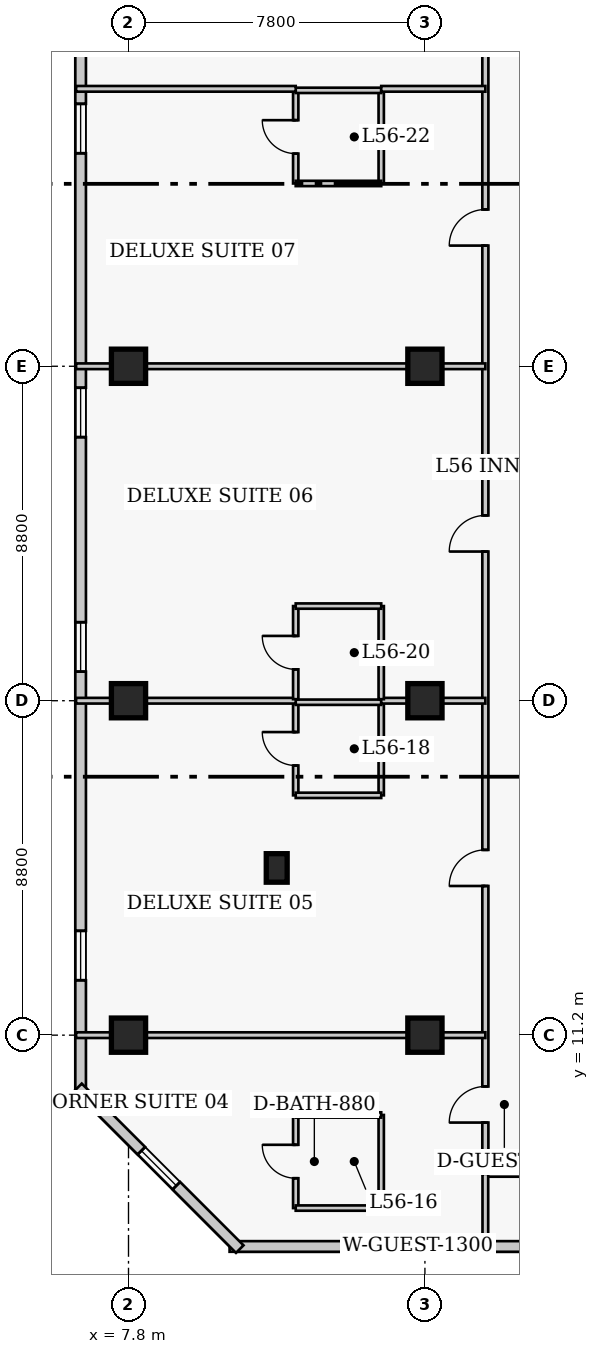
"""IFC4 building model, lengths in metres.
Left out: names, types, materials, properties, quantities, classifications, styles, units other than length and angle.
Written with IfcOpenShell. Run it as: python <this file> out.ifc"""

import sys

from ifc_helpers import new_model, si_unit, direction, frame, frame_2d, origin, origin_2d, place, context, subcontext, project, spatial, rectangle, extrude, element, fill, save


model = new_model("IFC4")
c1 = context("Model", 3, precision=1e-05, world=origin(), true_north=direction((0.0, 1.0)))
c2 = subcontext(c1, "Body", "Model", "MODEL_VIEW")
j1 = project(units=[si_unit("LENGTHUNIT", "METRE"), si_unit("PLANEANGLEUNIT", "RADIAN")], contexts=[c1])
p1 = place(None, origin())
s1 = spatial("IfcSite", under=j1, at=p1, CompositionType="ELEMENT")
p2 = place(p1, origin())
s2 = spatial("IfcBuilding", under=s1, at=p2, CompositionType="ELEMENT")
p3 = place(p2, frame((0.0, 0.0, 224.1)))
s3 = spatial("IfcBuildingStorey", under=s2, at=p3, CompositionType="ELEMENT", Elevation=224.1)
for number, where, z_axis, x_axis in (
    (1, (7.8, 11.2, 0.0), (0.0, 0.0, 1.0), (1.0, 0.0, 0.0)),
    (2, (7.8, 20.0, 0.0), (0.0, 0.0, 1.0), (1.0, 0.0, 0.0)),
    (3, (7.8, 28.8, 0.0), (0.0, 0.0, 1.0), (1.0, 0.0, 0.0)),
    (4, (15.6, 11.2, 0.0), (0.0, 0.0, 1.0), (1.0, 0.0, 0.0)),
    (5, (15.6, 20.0, 0.0), (0.0, 0.0, 1.0), (1.0, 0.0, 0.0)),
    (6, (15.6, 28.8, 0.0), (0.0, 0.0, 1.0), (1.0, 0.0, 0.0)),
):
    element("IfcColumn", number, at=place(p3, frame(where, z_axis=z_axis, x_axis=x_axis)), inside=s3, PredefinedType="COLUMN", context=c2, shape_type="SweptSolid", body=[
        extrude(rectangle(XDim=0.9, YDim=0.9, at=origin_2d()), origin(), (0.0, 0.0, 1.0), 3.9),
    ])
p4 = place(p3, frame((11.7, 15.6, 0.0), z_axis=(0.0, 0.0, 1.0), x_axis=(1.0, 0.0, 0.0)))
e7 = element("IfcColumn", 7, at=p4, inside=s3, PredefinedType="PILASTER", context=c2, shape_type="SweptSolid", body=[
    extrude(rectangle(XDim=0.55, YDim=0.75, at=origin_2d()), origin(), (0.0, 0.0, 1.0), 3.9),
])
p5 = place(p3, frame((10.46, 5.64, 0.0), z_axis=(0.0, 0.0, 1.0), x_axis=(1.0, 0.0, 0.0)))
e8 = element("IfcWall", 8, at=p5, inside=s3, PredefinedType="SOLIDWALL", context=c2, shape_type="SweptSolid", body=[
    extrude(rectangle(XDim=25.83, YDim=0.28, at=frame_2d((12.915, 0.0))), origin(), (0.0, 0.0, 1.0), 3.65),
])
p6 = place(p5, frame((4.305, 0.0, 0.85)))
e9 = element("IfcOpeningElement", 9, at=p6, cuts=e8, PredefinedType="OPENING", context=c2, shape_type="SweptSolid", body=[
    extrude(rectangle(XDim=1.3, YDim=1.7, at=frame_2d((0.65, 0.85))), frame((0.0, 0.15, 0.0), z_axis=(0.0, -1.0, 0.0), x_axis=(1.0, 0.0, 0.0)), (0.0, 0.0, 1.0), 0.3),
])
p7 = place(p5, frame((11.615, 0.0, 0.85)))
e10 = element("IfcOpeningElement", 10, at=p7, cuts=e8, PredefinedType="OPENING", context=c2, shape_type="SweptSolid", body=[
    extrude(rectangle(XDim=1.3, YDim=1.7, at=frame_2d((0.65, 0.85))), frame((0.0, 0.15, 0.0), z_axis=(0.0, -1.0, 0.0), x_axis=(1.0, 0.0, 0.0)), (0.0, 0.0, 1.0), 0.3),
])
p8 = place(p5, frame((20.875, 0.0, 0.85)))
e11 = element("IfcOpeningElement", 11, at=p8, cuts=e8, PredefinedType="OPENING", context=c2, shape_type="SweptSolid", body=[
    extrude(rectangle(XDim=1.3, YDim=1.7, at=frame_2d((0.65, 0.85))), frame((0.0, 0.15, 0.0), z_axis=(0.0, -1.0, 0.0), x_axis=(1.0, 0.0, 0.0)), (0.0, 0.0, 1.0), 0.3),
])
p9 = place(p3, frame((6.54, 39.44, 0.0), z_axis=(0.0, 0.0, 1.0), x_axis=(0.0, -1.0, 0.0)))
e12 = element("IfcWall", 12, at=p9, inside=s3, PredefinedType="SOLIDWALL", context=c2, shape_type="SweptSolid", body=[
    extrude(rectangle(XDim=29.88, YDim=0.28, at=frame_2d((14.94, 0.0))), origin(), (0.0, 0.0, 1.0), 3.65),
])
p10 = place(p9, frame((3.735, 0.0, 0.85)))
e13 = element("IfcOpeningElement", 13, at=p10, cuts=e12, PredefinedType="OPENING", context=c2, shape_type="SweptSolid", body=[
    extrude(rectangle(XDim=1.3, YDim=1.7, at=frame_2d((0.65, 0.85))), frame((0.0, 0.15, 0.0), z_axis=(0.0, -1.0, 0.0), x_axis=(1.0, 0.0, 0.0)), (0.0, 0.0, 1.0), 0.3),
])
p11 = place(p9, frame((11.205, 0.0, 0.85)))
e14 = element("IfcOpeningElement", 14, at=p11, cuts=e12, PredefinedType="OPENING", context=c2, shape_type="SweptSolid", body=[
    extrude(rectangle(XDim=1.3, YDim=1.7, at=frame_2d((0.65, 0.85))), frame((0.0, 0.15, 0.0), z_axis=(0.0, -1.0, 0.0), x_axis=(1.0, 0.0, 0.0)), (0.0, 0.0, 1.0), 0.3),
])
p12 = place(p9, frame((17.375, 0.0, 0.85)))
e15 = element("IfcOpeningElement", 15, at=p12, cuts=e12, PredefinedType="OPENING", context=c2, shape_type="SweptSolid", body=[
    extrude(rectangle(XDim=1.3, YDim=1.7, at=frame_2d((0.65, 0.85))), frame((0.0, 0.15, 0.0), z_axis=(0.0, -1.0, 0.0), x_axis=(1.0, 0.0, 0.0)), (0.0, 0.0, 1.0), 0.3),
])
p13 = place(p9, frame((25.495, 0.0, 0.85)))
e16 = element("IfcOpeningElement", 16, at=p13, cuts=e12, PredefinedType="OPENING", context=c2, shape_type="SweptSolid", body=[
    extrude(rectangle(XDim=1.3, YDim=1.7, at=frame_2d((0.65, 0.85))), frame((0.0, 0.15, 0.0), z_axis=(0.0, -1.0, 0.0), x_axis=(1.0, 0.0, 0.0)), (0.0, 0.0, 1.0), 0.3),
])
p14 = place(p3, frame((6.471, 9.827, 0.0), z_axis=(0.0, 0.0, 1.0), x_axis=(0.707106781187, -0.707106781187, 0.0)))
e17 = element("IfcWall", 17, at=p14, inside=s3, PredefinedType="SOLIDWALL", context=c2, shape_type="SweptSolid", body=[
    extrude(rectangle(XDim=6.02, YDim=0.28, at=frame_2d((3.01, 0.0))), origin(), (0.0, 0.0, 1.0), 3.65),
])
p15 = place(p14, frame((2.36, 0.0, 0.85)))
e18 = element("IfcOpeningElement", 18, at=p15, cuts=e17, PredefinedType="OPENING", context=c2, shape_type="SweptSolid", body=[
    extrude(rectangle(XDim=1.3, YDim=1.7, at=frame_2d((0.65, 0.85))), frame((0.0, 0.15, 0.0), z_axis=(0.0, -1.0, 0.0), x_axis=(1.0, 0.0, 0.0)), (0.0, 0.0, 1.0), 0.3),
])
p16 = place(p3, frame((17.19, 7.55, 0.0), z_axis=(0.0, 0.0, 1.0), x_axis=(0.0, 1.0, 0.0)))
e19 = element("IfcWall", 19, at=p16, inside=s3, PredefinedType="PARTITIONING", context=c2, shape_type="SweptSolid", body=[
    extrude(rectangle(XDim=33.1, YDim=0.16, at=frame_2d((16.55, 0.0))), origin(), (0.0, 0.0, 1.0), 3.65),
])
p17 = place(p16, frame((1.35, 0.0, 0.0)))
e20 = element("IfcOpeningElement", 20, at=p17, cuts=e19, PredefinedType="OPENING", context=c2, shape_type="SweptSolid", body=[
    extrude(rectangle(XDim=0.95, YDim=2.1, at=frame_2d((0.475, 1.05))), frame((0.0, 0.09, 0.0), z_axis=(0.0, -1.0, 0.0), x_axis=(1.0, 0.0, 0.0)), (0.0, 0.0, 1.0), 0.18),
])
p18 = place(p16, frame((7.575, 0.0, 0.0)))
e21 = element("IfcOpeningElement", 21, at=p18, cuts=e19, PredefinedType="OPENING", context=c2, shape_type="SweptSolid", body=[
    extrude(rectangle(XDim=0.95, YDim=2.1, at=frame_2d((0.475, 1.05))), frame((0.0, 0.09, 0.0), z_axis=(0.0, -1.0, 0.0), x_axis=(1.0, 0.0, 0.0)), (0.0, 0.0, 1.0), 0.18),
])
p19 = place(p16, frame((16.375, 0.0, 0.0)))
e22 = element("IfcOpeningElement", 22, at=p19, cuts=e19, PredefinedType="OPENING", context=c2, shape_type="SweptSolid", body=[
    extrude(rectangle(XDim=0.95, YDim=2.1, at=frame_2d((0.475, 1.05))), frame((0.0, 0.09, 0.0), z_axis=(0.0, -1.0, 0.0), x_axis=(1.0, 0.0, 0.0)), (0.0, 0.0, 1.0), 0.18),
])
p20 = place(p16, frame((24.425, 0.0, 0.0)))
e23 = element("IfcOpeningElement", 23, at=p20, cuts=e19, PredefinedType="OPENING", context=c2, shape_type="SweptSolid", body=[
    extrude(rectangle(XDim=0.95, YDim=2.1, at=frame_2d((0.475, 1.05))), frame((0.0, 0.09, 0.0), z_axis=(0.0, -1.0, 0.0), x_axis=(1.0, 0.0, 0.0)), (0.0, 0.0, 1.0), 0.18),
])
p21 = place(p16, frame((31.66, 0.0, 0.0)))
e24 = element("IfcOpeningElement", 24, at=p21, cuts=e19, PredefinedType="OPENING", context=c2, shape_type="SweptSolid", body=[
    extrude(rectangle(XDim=1.0, YDim=2.15, at=frame_2d((0.5, 1.075))), frame((0.0, 0.09, 0.0), z_axis=(0.0, -1.0, 0.0), x_axis=(1.0, 0.0, 0.0)), (0.0, 0.0, 1.0), 0.18),
])
p22 = place(p3, frame((17.19, 7.55, 0.0), z_axis=(0.0, 0.0, 1.0), x_axis=(1.0, 0.0, 0.0)))
e25 = element("IfcWall", 25, at=p22, inside=s3, PredefinedType="PARTITIONING", context=c2, shape_type="SweptSolid", body=[
    extrude(rectangle(XDim=2.22, YDim=0.15, at=frame_2d((1.11, 0.0))), origin(), (0.0, 0.0, 1.0), 3.65),
])
p23 = place(p3, frame((17.19, 5.52, 0.0), z_axis=(0.0, 0.0, 1.0), x_axis=(0.0, 1.0, 0.0)))
e26 = element("IfcWall", 26, at=p23, inside=s3, PredefinedType="PARTITIONING", context=c2, shape_type="SweptSolid", body=[
    extrude(rectangle(XDim=2.03, YDim=0.15, at=frame_2d((1.015, 0.0))), origin(), (0.0, 0.0, 1.0), 3.65),
])
p24 = place(p3, frame((12.2, 6.65, 0.0), z_axis=(0.0, 0.0, 1.0), x_axis=(0.0, 1.0, 0.0)))
e27 = element("IfcWall", 27, at=p24, inside=s3, PredefinedType="PLUMBINGWALL", context=c2, shape_type="SweptSolid", body=[
    extrude(rectangle(XDim=2.45, YDim=0.14, at=frame_2d((1.225, 0.0))), origin(), (0.0, 0.0, 1.0), 3.65),
])
p25 = place(p24, frame((0.785, 0.0, 0.0)))
e28 = element("IfcOpeningElement", 28, at=p25, cuts=e27, PredefinedType="OPENING", context=c2, shape_type="SweptSolid", body=[
    extrude(rectangle(XDim=0.88, YDim=2.05, at=frame_2d((0.44, 1.025))), frame((0.0, 0.08, 0.0), z_axis=(0.0, -1.0, 0.0), x_axis=(1.0, 0.0, 0.0)), (0.0, 0.0, 1.0), 0.16),
])
p26 = place(p3, frame((14.45, 6.65, 0.0), z_axis=(0.0, 0.0, 1.0), x_axis=(0.0, 1.0, 0.0)))
e29 = element("IfcWall", 29, at=p26, inside=s3, PredefinedType="PLUMBINGWALL", context=c2, shape_type="SweptSolid", body=[
    extrude(rectangle(XDim=2.45, YDim=0.14, at=frame_2d((1.225, 0.0))), origin(), (0.0, 0.0, 1.0), 3.65),
])
for number, where, z_axis, x_axis in (
    (30, (12.2, 6.65, 0.0), (0.0, 0.0, 1.0), (1.0, 0.0, 0.0)),
    (31, (12.2, 9.1, 0.0), (0.0, 0.0, 1.0), (1.0, 0.0, 0.0)),
):
    element("IfcWall", number, at=place(p3, frame(where, z_axis=z_axis, x_axis=x_axis)), inside=s3, PredefinedType="PLUMBINGWALL", context=c2, shape_type="SweptSolid", body=[
        extrude(rectangle(XDim=2.25, YDim=0.14, at=frame_2d((1.125, 0.0))), origin(), (0.0, 0.0, 1.0), 3.65),
    ])
p27 = place(p3, frame((6.42, 11.2, 0.0), z_axis=(0.0, 0.0, 1.0), x_axis=(1.0, 0.0, 0.0)))
e32 = element("IfcWall", 32, at=p27, inside=s3, PredefinedType="PARTITIONING", context=c2, shape_type="SweptSolid", body=[
    extrude(rectangle(XDim=10.77, YDim=0.15, at=frame_2d((5.385, 0.0))), origin(), (0.0, 0.0, 1.0), 2.878),
])
p28 = place(p3, frame((12.2, 17.51, 0.0), z_axis=(0.0, 0.0, 1.0), x_axis=(0.0, 1.0, 0.0)))
e33 = element("IfcWall", 33, at=p28, inside=s3, PredefinedType="PLUMBINGWALL", context=c2, shape_type="SweptSolid", body=[
    extrude(rectangle(XDim=2.45, YDim=0.14, at=frame_2d((1.225, 0.0))), origin(), (0.0, 0.0, 1.0), 3.65),
])
p29 = place(p28, frame((0.785, 0.0, 0.0)))
e34 = element("IfcOpeningElement", 34, at=p29, cuts=e33, PredefinedType="OPENING", context=c2, shape_type="SweptSolid", body=[
    extrude(rectangle(XDim=0.88, YDim=2.05, at=frame_2d((0.44, 1.025))), frame((0.0, 0.08, 0.0), z_axis=(0.0, -1.0, 0.0), x_axis=(1.0, 0.0, 0.0)), (0.0, 0.0, 1.0), 0.16),
])
p30 = place(p3, frame((14.45, 17.51, 0.0), z_axis=(0.0, 0.0, 1.0), x_axis=(0.0, 1.0, 0.0)))
e35 = element("IfcWall", 35, at=p30, inside=s3, PredefinedType="PLUMBINGWALL", context=c2, shape_type="SweptSolid", body=[
    extrude(rectangle(XDim=2.45, YDim=0.14, at=frame_2d((1.225, 0.0))), origin(), (0.0, 0.0, 1.0), 3.65),
])
p31 = place(p3, frame((12.2, 17.51, 0.0), z_axis=(0.0, 0.0, 1.0), x_axis=(1.0, 0.0, 0.0)))
e36 = element("IfcWall", 36, at=p31, inside=s3, PredefinedType="PLUMBINGWALL", context=c2, shape_type="SweptSolid", body=[
    extrude(rectangle(XDim=2.25, YDim=0.14, at=frame_2d((1.125, 0.0))), origin(), (0.0, 0.0, 1.0), 3.65),
])
p32 = place(p3, frame((12.2, 19.96, 0.0), z_axis=(0.0, 0.0, 1.0), x_axis=(1.0, 0.0, 0.0)))
e37 = element("IfcWall", 37, at=p32, inside=s3, PredefinedType="PLUMBINGWALL", context=c2, shape_type="SweptSolid", body=[
    extrude(rectangle(XDim=2.25, YDim=0.14, at=frame_2d((1.125, 0.0))), origin(), (0.0, 0.0, 1.0), 3.038),
])
p33 = place(p3, frame((6.42, 20.0, 0.0), z_axis=(0.0, 0.0, 1.0), x_axis=(1.0, 0.0, 0.0)))
e38 = element("IfcWall", 38, at=p33, inside=s3, PredefinedType="PARTITIONING", context=c2, shape_type="SweptSolid", body=[
    extrude(rectangle(XDim=5.78, YDim=0.15, at=frame_2d((2.89, 0.0))), origin(), (0.0, 0.0, 1.0), 2.878),
])
p34 = place(p3, frame((14.45, 20.0, 0.0), z_axis=(0.0, 0.0, 1.0), x_axis=(1.0, 0.0, 0.0)))
e39 = element("IfcWall", 39, at=p34, inside=s3, PredefinedType="PARTITIONING", context=c2, shape_type="SweptSolid", body=[
    extrude(rectangle(XDim=2.74, YDim=0.15, at=frame_2d((1.37, 0.0))), origin(), (0.0, 0.0, 1.0), 2.878),
])
p35 = place(p3, frame((12.2, 20.04, 0.0), z_axis=(0.0, 0.0, 1.0), x_axis=(0.0, 1.0, 0.0)))
e40 = element("IfcWall", 40, at=p35, inside=s3, PredefinedType="PLUMBINGWALL", context=c2, shape_type="SweptSolid", body=[
    extrude(rectangle(XDim=2.45, YDim=0.14, at=frame_2d((1.225, 0.0))), origin(), (0.0, 0.0, 1.0), 3.65),
])
p36 = place(p35, frame((0.785, 0.0, 0.0)))
e41 = element("IfcOpeningElement", 41, at=p36, cuts=e40, PredefinedType="OPENING", context=c2, shape_type="SweptSolid", body=[
    extrude(rectangle(XDim=0.88, YDim=2.05, at=frame_2d((0.44, 1.025))), frame((0.0, 0.08, 0.0), z_axis=(0.0, -1.0, 0.0), x_axis=(1.0, 0.0, 0.0)), (0.0, 0.0, 1.0), 0.16),
])
p37 = place(p3, frame((14.45, 20.04, 0.0), z_axis=(0.0, 0.0, 1.0), x_axis=(0.0, 1.0, 0.0)))
e42 = element("IfcWall", 42, at=p37, inside=s3, PredefinedType="PLUMBINGWALL", context=c2, shape_type="SweptSolid", body=[
    extrude(rectangle(XDim=2.45, YDim=0.14, at=frame_2d((1.225, 0.0))), origin(), (0.0, 0.0, 1.0), 3.65),
])
p38 = place(p3, frame((12.2, 22.49, 0.0), z_axis=(0.0, 0.0, 1.0), x_axis=(1.0, 0.0, 0.0)))
e43 = element("IfcWall", 43, at=p38, inside=s3, PredefinedType="PLUMBINGWALL", context=c2, shape_type="SweptSolid", body=[
    extrude(rectangle(XDim=2.25, YDim=0.14, at=frame_2d((1.125, 0.0))), origin(), (0.0, 0.0, 1.0), 3.65),
])
p39 = place(p3, frame((6.42, 28.8, 0.0), z_axis=(0.0, 0.0, 1.0), x_axis=(1.0, 0.0, 0.0)))
e44 = element("IfcWall", 44, at=p39, inside=s3, PredefinedType="PARTITIONING", context=c2, shape_type="SweptSolid", body=[
    extrude(rectangle(XDim=10.77, YDim=0.15, at=frame_2d((5.385, 0.0))), origin(), (0.0, 0.0, 1.0), 2.878),
])
p40 = place(p3, frame((12.2, 33.61, 0.0), z_axis=(0.0, 0.0, 1.0), x_axis=(0.0, 1.0, 0.0)))
e45 = element("IfcWall", 45, at=p40, inside=s3, PredefinedType="PLUMBINGWALL", context=c2, shape_type="SweptSolid", body=[
    extrude(rectangle(XDim=2.45, YDim=0.14, at=frame_2d((1.225, 0.0))), origin(), (0.0, 0.0, 1.0), 3.65),
])
p41 = place(p40, frame((0.785, 0.0, 0.0)))
e46 = element("IfcOpeningElement", 46, at=p41, cuts=e45, PredefinedType="OPENING", context=c2, shape_type="SweptSolid", body=[
    extrude(rectangle(XDim=0.88, YDim=2.05, at=frame_2d((0.44, 1.025))), frame((0.0, 0.08, 0.0), z_axis=(0.0, -1.0, 0.0), x_axis=(1.0, 0.0, 0.0)), (0.0, 0.0, 1.0), 0.16),
])
p42 = place(p3, frame((14.45, 33.61, 0.0), z_axis=(0.0, 0.0, 1.0), x_axis=(0.0, 1.0, 0.0)))
e47 = element("IfcWall", 47, at=p42, inside=s3, PredefinedType="PLUMBINGWALL", context=c2, shape_type="SweptSolid", body=[
    extrude(rectangle(XDim=2.45, YDim=0.14, at=frame_2d((1.225, 0.0))), origin(), (0.0, 0.0, 1.0), 3.65),
])
for number, where, z_axis, x_axis in (
    (48, (12.2, 33.61, 0.0), (0.0, 0.0, 1.0), (1.0, 0.0, 0.0)),
    (49, (12.2, 36.06, 0.0), (0.0, 0.0, 1.0), (1.0, 0.0, 0.0)),
):
    element("IfcWall", number, at=place(p3, frame(where, z_axis=z_axis, x_axis=x_axis)), inside=s3, PredefinedType="PLUMBINGWALL", context=c2, shape_type="SweptSolid", body=[
        extrude(rectangle(XDim=2.25, YDim=0.14, at=frame_2d((1.125, 0.0))), origin(), (0.0, 0.0, 1.0), 3.65),
    ])
p43 = place(p3, frame((6.42, 36.1, 0.0), z_axis=(0.0, 0.0, 1.0), x_axis=(1.0, 0.0, 0.0)))
e50 = element("IfcWall", 50, at=p43, inside=s3, PredefinedType="PARTITIONING", context=c2, shape_type="SweptSolid", body=[
    extrude(rectangle(XDim=5.78, YDim=0.15, at=frame_2d((2.89, 0.0))), origin(), (0.0, 0.0, 1.0), 3.65),
])
p44 = place(p3, frame((14.45, 36.1, 0.0), z_axis=(0.0, 0.0, 1.0), x_axis=(1.0, 0.0, 0.0)))
e51 = element("IfcWall", 51, at=p44, inside=s3, PredefinedType="PARTITIONING", context=c2, shape_type="SweptSolid", body=[
    extrude(rectangle(XDim=2.74, YDim=0.15, at=frame_2d((1.37, 0.0))), origin(), (0.0, 0.0, 1.0), 3.65),
])
p45 = place(p6, origin())
e52 = element("IfcWindow", 52, at=p45, inside=s3, PartitioningType="SINGLE_PANEL", PredefinedType="WINDOW", context=c2, shape_type="SweptSolid", body=[
    extrude(rectangle(XDim=1.3, YDim=1.7, at=frame_2d((0.65, 0.85))), frame((0.0, 0.03, 0.0), z_axis=(0.0, -1.0, 0.0), x_axis=(1.0, 0.0, 0.0)), (0.0, 0.0, 1.0), 0.06),
])
fill(e9, e52)
p46 = place(p10, origin())
e53 = element("IfcWindow", 53, at=p46, inside=s3, PartitioningType="SINGLE_PANEL", PredefinedType="WINDOW", context=c2, shape_type="SweptSolid", body=[
    extrude(rectangle(XDim=1.3, YDim=1.7, at=frame_2d((0.65, 0.85))), frame((0.0, 0.03, 0.0), z_axis=(0.0, -1.0, 0.0), x_axis=(1.0, 0.0, 0.0)), (0.0, 0.0, 1.0), 0.06),
])
fill(e13, e53)
p47 = place(p11, origin())
e54 = element("IfcWindow", 54, at=p47, inside=s3, PartitioningType="SINGLE_PANEL", PredefinedType="WINDOW", context=c2, shape_type="SweptSolid", body=[
    extrude(rectangle(XDim=1.3, YDim=1.7, at=frame_2d((0.65, 0.85))), frame((0.0, 0.03, 0.0), z_axis=(0.0, -1.0, 0.0), x_axis=(1.0, 0.0, 0.0)), (0.0, 0.0, 1.0), 0.06),
])
fill(e14, e54)
p48 = place(p12, origin())
e55 = element("IfcWindow", 55, at=p48, inside=s3, PartitioningType="SINGLE_PANEL", PredefinedType="WINDOW", context=c2, shape_type="SweptSolid", body=[
    extrude(rectangle(XDim=1.3, YDim=1.7, at=frame_2d((0.65, 0.85))), frame((0.0, 0.03, 0.0), z_axis=(0.0, -1.0, 0.0), x_axis=(1.0, 0.0, 0.0)), (0.0, 0.0, 1.0), 0.06),
])
fill(e15, e55)
p49 = place(p13, origin())
e56 = element("IfcWindow", 56, at=p49, inside=s3, PartitioningType="SINGLE_PANEL", PredefinedType="WINDOW", context=c2, shape_type="SweptSolid", body=[
    extrude(rectangle(XDim=1.3, YDim=1.7, at=frame_2d((0.65, 0.85))), frame((0.0, 0.03, 0.0), z_axis=(0.0, -1.0, 0.0), x_axis=(1.0, 0.0, 0.0)), (0.0, 0.0, 1.0), 0.06),
])
fill(e16, e56)
p50 = place(p15, origin())
e57 = element("IfcWindow", 57, at=p50, inside=s3, PartitioningType="SINGLE_PANEL", PredefinedType="WINDOW", context=c2, shape_type="SweptSolid", body=[
    extrude(rectangle(XDim=1.3, YDim=1.7, at=frame_2d((0.65, 0.85))), frame((0.0, 0.03, 0.0), z_axis=(0.0, -1.0, 0.0), x_axis=(1.0, 0.0, 0.0)), (0.0, 0.0, 1.0), 0.06),
])
fill(e18, e57)
p51 = place(p25, origin())
e58 = element("IfcDoor", 58, at=p51, inside=s3, OperationType="SINGLE_SWING_RIGHT", PredefinedType="DOOR", context=c2, shape_type="SweptSolid", body=[
    extrude(rectangle(XDim=0.88, YDim=2.05, at=frame_2d((0.44, 1.025))), frame((0.0, 0.025, 0.0), z_axis=(0.0, -1.0, 0.0), x_axis=(1.0, 0.0, 0.0)), (0.0, 0.0, 1.0), 0.05),
])
fill(e28, e58)
p52 = place(p17, origin())
e59 = element("IfcDoor", 59, at=p52, inside=s3, OperationType="SINGLE_SWING_LEFT", PredefinedType="DOOR", context=c2, shape_type="SweptSolid", body=[
    extrude(rectangle(XDim=0.95, YDim=2.1, at=frame_2d((0.475, 1.05))), frame((0.0, 0.025, 0.0), z_axis=(0.0, -1.0, 0.0), x_axis=(1.0, 0.0, 0.0)), (0.0, 0.0, 1.0), 0.05),
])
fill(e20, e59)
p53 = place(p29, origin())
e60 = element("IfcDoor", 60, at=p53, inside=s3, OperationType="SINGLE_SWING_RIGHT", PredefinedType="DOOR", context=c2, shape_type="SweptSolid", body=[
    extrude(rectangle(XDim=0.88, YDim=2.05, at=frame_2d((0.44, 1.025))), frame((0.0, 0.025, 0.0), z_axis=(0.0, -1.0, 0.0), x_axis=(1.0, 0.0, 0.0)), (0.0, 0.0, 1.0), 0.05),
])
fill(e34, e60)
p54 = place(p18, origin())
e61 = element("IfcDoor", 61, at=p54, inside=s3, OperationType="SINGLE_SWING_LEFT", PredefinedType="DOOR", context=c2, shape_type="SweptSolid", body=[
    extrude(rectangle(XDim=0.95, YDim=2.1, at=frame_2d((0.475, 1.05))), frame((0.0, 0.025, 0.0), z_axis=(0.0, -1.0, 0.0), x_axis=(1.0, 0.0, 0.0)), (0.0, 0.0, 1.0), 0.05),
])
fill(e21, e61)
p55 = place(p36, origin())
e62 = element("IfcDoor", 62, at=p55, inside=s3, OperationType="SINGLE_SWING_RIGHT", PredefinedType="DOOR", context=c2, shape_type="SweptSolid", body=[
    extrude(rectangle(XDim=0.88, YDim=2.05, at=frame_2d((0.44, 1.025))), frame((0.0, 0.025, 0.0), z_axis=(0.0, -1.0, 0.0), x_axis=(1.0, 0.0, 0.0)), (0.0, 0.0, 1.0), 0.05),
])
fill(e41, e62)
p56 = place(p19, origin())
e63 = element("IfcDoor", 63, at=p56, inside=s3, OperationType="SINGLE_SWING_LEFT", PredefinedType="DOOR", context=c2, shape_type="SweptSolid", body=[
    extrude(rectangle(XDim=0.95, YDim=2.1, at=frame_2d((0.475, 1.05))), frame((0.0, 0.025, 0.0), z_axis=(0.0, -1.0, 0.0), x_axis=(1.0, 0.0, 0.0)), (0.0, 0.0, 1.0), 0.05),
])
fill(e22, e63)
p57 = place(p41, origin())
e64 = element("IfcDoor", 64, at=p57, inside=s3, OperationType="SINGLE_SWING_RIGHT", PredefinedType="DOOR", context=c2, shape_type="SweptSolid", body=[
    extrude(rectangle(XDim=0.88, YDim=2.05, at=frame_2d((0.44, 1.025))), frame((0.0, 0.025, 0.0), z_axis=(0.0, -1.0, 0.0), x_axis=(1.0, 0.0, 0.0)), (0.0, 0.0, 1.0), 0.05),
])
fill(e46, e64)
p58 = place(p20, origin())
e65 = element("IfcDoor", 65, at=p58, inside=s3, OperationType="SINGLE_SWING_LEFT", PredefinedType="DOOR", context=c2, shape_type="SweptSolid", body=[
    extrude(rectangle(XDim=0.95, YDim=2.1, at=frame_2d((0.475, 1.05))), frame((0.0, 0.025, 0.0), z_axis=(0.0, -1.0, 0.0), x_axis=(1.0, 0.0, 0.0)), (0.0, 0.0, 1.0), 0.05),
])
fill(e23, e65)
save(model, sys.argv[1])
